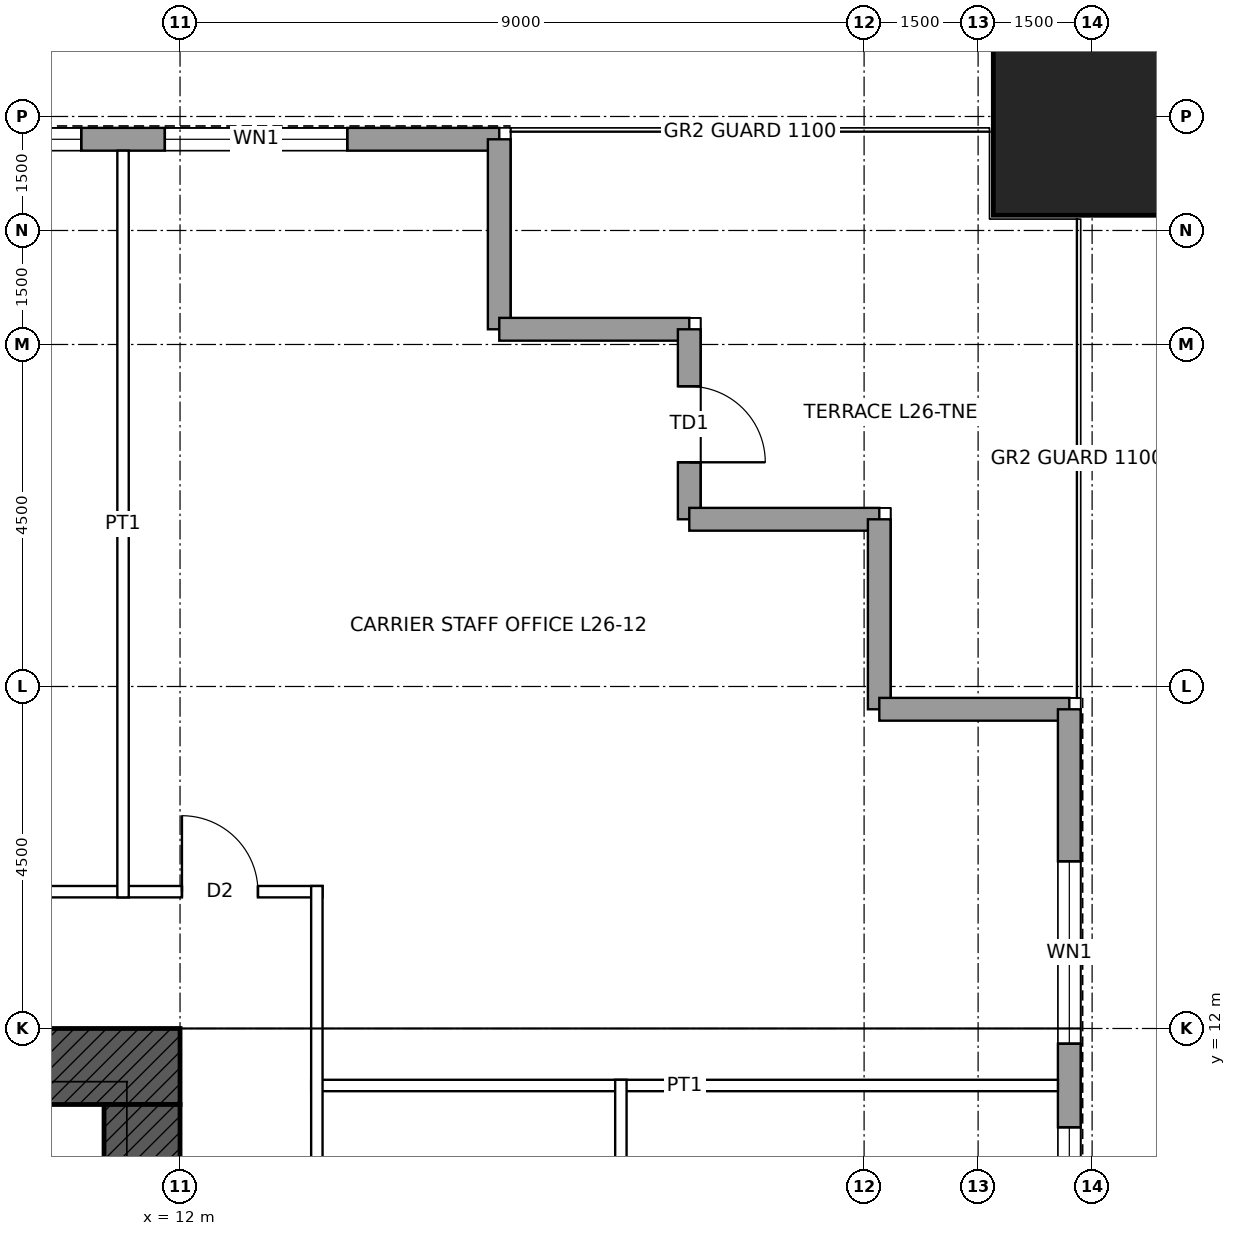
"""IFC4 building model, lengths in metres.
Left out: names, types, materials, properties, quantities, classifications, styles, units other than length and angle.
Written with IfcOpenShell. Run it as: python <this file> out.ifc"""

import sys

from ifc_helpers import new_model, si_unit, direction, frame, frame_2d, origin, origin_2d, place, context, subcontext, project, spatial, rectangle, hollow_rectangle, extrude, element, fill, save


model = new_model("IFC4")
c1 = context("Model", 3, precision=1e-05, world=origin(), true_north=direction((0.0, 1.0)))
c2 = subcontext(c1, "Body", "Model", "MODEL_VIEW")
j1 = project(units=[si_unit("LENGTHUNIT", "METRE"), si_unit("PLANEANGLEUNIT", "RADIAN")], contexts=[c1])
p1 = place(None, origin())
s1 = spatial("IfcSite", under=j1, at=p1, CompositionType="ELEMENT")
p2 = place(p1, origin())
s2 = spatial("IfcBuilding", under=s1, at=p2, CompositionType="ELEMENT")
p3 = place(p2, frame((0.0, 0.0, 131.4)))
s3 = spatial("IfcBuildingStorey", under=s2, at=p3, CompositionType="ELEMENT", Elevation=131.4)
p4 = place(p3, frame((24.0, 24.0, 0.0), z_axis=(0.0, 0.0, 1.0), x_axis=(1.0, 0.0, 0.0)))
e1 = element("IfcColumn", 1, at=p4, inside=s3, PredefinedType="COLUMN", context=c2, shape_type="SweptSolid", body=[
    extrude(hollow_rectangle(XDim=2.6, YDim=2.6, WallThickness=0.13, at=origin_2d()), origin(), (0.0, 0.0, 1.0), 4.5),
])
p5 = place(p3, frame((-12.0, 11.5, 0.0), z_axis=(0.0, 0.0, 1.0), x_axis=(1.0, 0.0, 0.0)))
e2 = element("IfcWall", 2, at=p5, inside=s3, PredefinedType="SHEAR", context=c2, shape_type="SweptSolid", body=[
    extrude(rectangle(XDim=24.0, YDim=1.0, at=frame_2d((12.0, 0.0))), origin(), (0.0, 0.0, 1.0), 4.5),
])
p6 = place(p5, frame((6.25, 0.0, 0.0)))
e3 = element("IfcOpeningElement", 3, at=p6, cuts=e2, PredefinedType="OPENING", context=c2, shape_type="SweptSolid", body=[
    extrude(rectangle(XDim=1.0, YDim=2.4, at=frame_2d((0.5, 1.2))), frame((0.0, 0.51, 0.0), z_axis=(0.0, -1.0, 0.0), x_axis=(1.0, 0.0, 0.0)), (0.0, 0.0, 1.0), 1.02),
])
p7 = place(p5, frame((16.75, 0.0, 0.0)))
e4 = element("IfcOpeningElement", 4, at=p7, cuts=e2, PredefinedType="OPENING", context=c2, shape_type="SweptSolid", body=[
    extrude(rectangle(XDim=1.0, YDim=2.4, at=frame_2d((0.5, 1.2))), frame((0.0, 0.51, 0.0), z_axis=(0.0, -1.0, 0.0), x_axis=(1.0, 0.0, 0.0)), (0.0, 0.0, 1.0), 1.02),
])
p8 = place(p3, frame((11.5, 11.0, 0.0), z_axis=(0.0, 0.0, 1.0), x_axis=(0.0, -1.0, 0.0)))
e5 = element("IfcWall", 5, at=p8, inside=s3, PredefinedType="SHEAR", context=c2, shape_type="SweptSolid", body=[
    extrude(rectangle(XDim=22.0, YDim=1.0, at=frame_2d((11.0, 0.0))), origin(), (0.0, 0.0, 1.0), 4.5),
])
p9 = place(p8, frame((10.5, 0.0, 0.0)))
e6 = element("IfcOpeningElement", 6, at=p9, cuts=e5, PredefinedType="OPENING", context=c2, shape_type="SweptSolid", body=[
    extrude(rectangle(XDim=1.0, YDim=2.4, at=frame_2d((0.5, 1.2))), frame((0.0, 0.51, 0.0), z_axis=(0.0, -1.0, 0.0), x_axis=(1.0, 0.0, 0.0)), (0.0, 0.0, 1.0), 1.02),
])
p10 = place(p3, frame((-16.2, 23.7, 0.0), z_axis=(0.0, 0.0, 1.0), x_axis=(1.0, 0.0, 0.0)))
e7 = element("IfcWall", 7, at=p10, inside=s3, PredefinedType="SOLIDWALL", context=c2, shape_type="SweptSolid", body=[
    extrude(rectangle(XDim=32.4, YDim=0.3, at=frame_2d((16.2, 0.0))), origin(), (0.0, 0.0, 1.0), 4.3),
])
p11 = place(p10, frame((2.0, 0.0, 1.0)))
e8 = element("IfcOpeningElement", 8, at=p11, cuts=e7, PredefinedType="OPENING", context=c2, shape_type="SweptSolid", body=[
    extrude(rectangle(XDim=2.4, YDim=1.2, at=frame_2d((1.2, 0.6))), frame((0.0, 0.16, 0.0), z_axis=(0.0, -1.0, 0.0), x_axis=(1.0, 0.0, 0.0)), (0.0, 0.0, 1.0), 0.32),
])
p12 = place(p10, frame((5.5, 0.0, 1.0)))
e9 = element("IfcOpeningElement", 9, at=p12, cuts=e7, PredefinedType="OPENING", context=c2, shape_type="SweptSolid", body=[
    extrude(rectangle(XDim=2.4, YDim=1.2, at=frame_2d((1.2, 0.6))), frame((0.0, 0.16, 0.0), z_axis=(0.0, -1.0, 0.0), x_axis=(1.0, 0.0, 0.0)), (0.0, 0.0, 1.0), 0.32),
])
p13 = place(p10, frame((9.5, 0.0, 1.0)))
e10 = element("IfcOpeningElement", 10, at=p13, cuts=e7, PredefinedType="OPENING", context=c2, shape_type="SweptSolid", body=[
    extrude(rectangle(XDim=2.4, YDim=1.2, at=frame_2d((1.2, 0.6))), frame((0.0, 0.16, 0.0), z_axis=(0.0, -1.0, 0.0), x_axis=(1.0, 0.0, 0.0)), (0.0, 0.0, 1.0), 0.32),
])
p14 = place(p10, frame((13.0, 0.0, 1.0)))
e11 = element("IfcOpeningElement", 11, at=p14, cuts=e7, PredefinedType="OPENING", context=c2, shape_type="SweptSolid", body=[
    extrude(rectangle(XDim=2.4, YDim=1.2, at=frame_2d((1.2, 0.6))), frame((0.0, 0.16, 0.0), z_axis=(0.0, -1.0, 0.0), x_axis=(1.0, 0.0, 0.0)), (0.0, 0.0, 1.0), 0.32),
])
p15 = place(p10, frame((17.0, 0.0, 1.0)))
e12 = element("IfcOpeningElement", 12, at=p15, cuts=e7, PredefinedType="OPENING", context=c2, shape_type="SweptSolid", body=[
    extrude(rectangle(XDim=2.4, YDim=1.2, at=frame_2d((1.2, 0.6))), frame((0.0, 0.16, 0.0), z_axis=(0.0, -1.0, 0.0), x_axis=(1.0, 0.0, 0.0)), (0.0, 0.0, 1.0), 0.32),
])
p16 = place(p10, frame((20.5, 0.0, 1.0)))
e13 = element("IfcOpeningElement", 13, at=p16, cuts=e7, PredefinedType="OPENING", context=c2, shape_type="SweptSolid", body=[
    extrude(rectangle(XDim=2.4, YDim=1.2, at=frame_2d((1.2, 0.6))), frame((0.0, 0.16, 0.0), z_axis=(0.0, -1.0, 0.0), x_axis=(1.0, 0.0, 0.0)), (0.0, 0.0, 1.0), 0.32),
])
p17 = place(p10, frame((24.5, 0.0, 1.0)))
e14 = element("IfcOpeningElement", 14, at=p17, cuts=e7, PredefinedType="OPENING", context=c2, shape_type="SweptSolid", body=[
    extrude(rectangle(XDim=2.4, YDim=1.2, at=frame_2d((1.2, 0.6))), frame((0.0, 0.16, 0.0), z_axis=(0.0, -1.0, 0.0), x_axis=(1.0, 0.0, 0.0)), (0.0, 0.0, 1.0), 0.32),
])
p18 = place(p10, frame((28.0, 0.0, 1.0)))
e15 = element("IfcOpeningElement", 15, at=p18, cuts=e7, PredefinedType="OPENING", context=c2, shape_type="SweptSolid", body=[
    extrude(rectangle(XDim=2.4, YDim=1.2, at=frame_2d((1.2, 0.6))), frame((0.0, 0.16, 0.0), z_axis=(0.0, -1.0, 0.0), x_axis=(1.0, 0.0, 0.0)), (0.0, 0.0, 1.0), 0.32),
])
for number, where, z_axis, x_axis in (
    (16, (16.2, 23.7, 0.0), (0.0, 0.0, 1.0), (0.0, -1.0, 0.0)),
    (17, (16.2, 21.2, 0.0), (0.0, 0.0, 1.0), (1.0, 0.0, 0.0)),
):
    element("IfcWall", number, at=place(p3, frame(where, z_axis=z_axis, x_axis=x_axis)), inside=s3, PredefinedType="SOLIDWALL", context=c2, shape_type="SweptSolid", body=[
        extrude(rectangle(XDim=2.5, YDim=0.3, at=frame_2d((1.25, 0.0))), origin(), (0.0, 0.0, 1.0), 4.3),
    ])
p19 = place(p3, frame((18.7, 21.2, 0.0), z_axis=(0.0, 0.0, 1.0), x_axis=(0.0, -1.0, 0.0)))
e18 = element("IfcWall", 18, at=p19, inside=s3, PredefinedType="SOLIDWALL", context=c2, shape_type="SweptSolid", body=[
    extrude(rectangle(XDim=2.5, YDim=0.3, at=frame_2d((1.25, 0.0))), origin(), (0.0, 0.0, 1.0), 4.3),
])
p20 = place(p19, frame((0.75, 0.0, 0.0)))
e19 = element("IfcOpeningElement", 19, at=p20, cuts=e18, PredefinedType="OPENING", context=c2, shape_type="SweptSolid", body=[
    extrude(rectangle(XDim=1.0, YDim=2.4, at=frame_2d((0.5, 1.2))), frame((0.0, 0.16, 0.0), z_axis=(0.0, -1.0, 0.0), x_axis=(1.0, 0.0, 0.0)), (0.0, 0.0, 1.0), 0.32),
])
for number, where, z_axis, x_axis in (
    (20, (18.7, 18.7, 0.0), (0.0, 0.0, 1.0), (1.0, 0.0, 0.0)),
    (21, (21.2, 18.7, 0.0), (0.0, 0.0, 1.0), (0.0, -1.0, 0.0)),
    (22, (21.2, 16.2, 0.0), (0.0, 0.0, 1.0), (1.0, 0.0, 0.0)),
):
    element("IfcWall", number, at=place(p3, frame(where, z_axis=z_axis, x_axis=x_axis)), inside=s3, PredefinedType="SOLIDWALL", context=c2, shape_type="SweptSolid", body=[
        extrude(rectangle(XDim=2.5, YDim=0.3, at=frame_2d((1.25, 0.0))), origin(), (0.0, 0.0, 1.0), 4.3),
    ])
p21 = place(p3, frame((23.7, 16.2, 0.0), z_axis=(0.0, 0.0, 1.0), x_axis=(0.0, -1.0, 0.0)))
e23 = element("IfcWall", 23, at=p21, inside=s3, PredefinedType="SOLIDWALL", context=c2, shape_type="SweptSolid", body=[
    extrude(rectangle(XDim=32.4, YDim=0.3, at=frame_2d((16.2, 0.0))), origin(), (0.0, 0.0, 1.0), 4.3),
])
p22 = place(p21, frame((2.0, 0.0, 1.0)))
e24 = element("IfcOpeningElement", 24, at=p22, cuts=e23, PredefinedType="OPENING", context=c2, shape_type="SweptSolid", body=[
    extrude(rectangle(XDim=2.4, YDim=1.2, at=frame_2d((1.2, 0.6))), frame((0.0, 0.16, 0.0), z_axis=(0.0, -1.0, 0.0), x_axis=(1.0, 0.0, 0.0)), (0.0, 0.0, 1.0), 0.32),
])
p23 = place(p21, frame((5.5, 0.0, 1.0)))
e25 = element("IfcOpeningElement", 25, at=p23, cuts=e23, PredefinedType="OPENING", context=c2, shape_type="SweptSolid", body=[
    extrude(rectangle(XDim=2.4, YDim=1.2, at=frame_2d((1.2, 0.6))), frame((0.0, 0.16, 0.0), z_axis=(0.0, -1.0, 0.0), x_axis=(1.0, 0.0, 0.0)), (0.0, 0.0, 1.0), 0.32),
])
p24 = place(p21, frame((9.5, 0.0, 1.0)))
e26 = element("IfcOpeningElement", 26, at=p24, cuts=e23, PredefinedType="OPENING", context=c2, shape_type="SweptSolid", body=[
    extrude(rectangle(XDim=2.4, YDim=1.2, at=frame_2d((1.2, 0.6))), frame((0.0, 0.16, 0.0), z_axis=(0.0, -1.0, 0.0), x_axis=(1.0, 0.0, 0.0)), (0.0, 0.0, 1.0), 0.32),
])
p25 = place(p21, frame((13.0, 0.0, 1.0)))
e27 = element("IfcOpeningElement", 27, at=p25, cuts=e23, PredefinedType="OPENING", context=c2, shape_type="SweptSolid", body=[
    extrude(rectangle(XDim=2.4, YDim=1.2, at=frame_2d((1.2, 0.6))), frame((0.0, 0.16, 0.0), z_axis=(0.0, -1.0, 0.0), x_axis=(1.0, 0.0, 0.0)), (0.0, 0.0, 1.0), 0.32),
])
p26 = place(p21, frame((17.0, 0.0, 1.0)))
e28 = element("IfcOpeningElement", 28, at=p26, cuts=e23, PredefinedType="OPENING", context=c2, shape_type="SweptSolid", body=[
    extrude(rectangle(XDim=2.4, YDim=1.2, at=frame_2d((1.2, 0.6))), frame((0.0, 0.16, 0.0), z_axis=(0.0, -1.0, 0.0), x_axis=(1.0, 0.0, 0.0)), (0.0, 0.0, 1.0), 0.32),
])
p27 = place(p21, frame((20.5, 0.0, 1.0)))
e29 = element("IfcOpeningElement", 29, at=p27, cuts=e23, PredefinedType="OPENING", context=c2, shape_type="SweptSolid", body=[
    extrude(rectangle(XDim=2.4, YDim=1.2, at=frame_2d((1.2, 0.6))), frame((0.0, 0.16, 0.0), z_axis=(0.0, -1.0, 0.0), x_axis=(1.0, 0.0, 0.0)), (0.0, 0.0, 1.0), 0.32),
])
p28 = place(p21, frame((24.5, 0.0, 1.0)))
e30 = element("IfcOpeningElement", 30, at=p28, cuts=e23, PredefinedType="OPENING", context=c2, shape_type="SweptSolid", body=[
    extrude(rectangle(XDim=2.4, YDim=1.2, at=frame_2d((1.2, 0.6))), frame((0.0, 0.16, 0.0), z_axis=(0.0, -1.0, 0.0), x_axis=(1.0, 0.0, 0.0)), (0.0, 0.0, 1.0), 0.32),
])
p29 = place(p21, frame((28.0, 0.0, 1.0)))
e31 = element("IfcOpeningElement", 31, at=p29, cuts=e23, PredefinedType="OPENING", context=c2, shape_type="SweptSolid", body=[
    extrude(rectangle(XDim=2.4, YDim=1.2, at=frame_2d((1.2, 0.6))), frame((0.0, 0.16, 0.0), z_axis=(0.0, -1.0, 0.0), x_axis=(1.0, 0.0, 0.0)), (0.0, 0.0, 1.0), 0.32),
])
p30 = place(p3, frame((13.725, 11.25, 0.0), z_axis=(0.0, 0.0, 1.0), x_axis=(1.0, 0.0, 0.0)))
e32 = element("IfcWall", 32, at=p30, inside=s3, PredefinedType="PARTITIONING", context=c2, shape_type="SweptSolid", body=[
    extrude(rectangle(XDim=9.825, YDim=0.15, at=frame_2d((4.913, 0.0))), origin(), (0.0, 0.0, 1.0), 3.431),
])
p31 = place(p3, frame((-13.875, 13.8, 0.0), z_axis=(0.0, 0.0, 1.0), x_axis=(1.0, 0.0, 0.0)))
e33 = element("IfcWall", 33, at=p31, inside=s3, PredefinedType="PARTITIONING", context=c2, shape_type="SweptSolid", body=[
    extrude(rectangle(XDim=27.75, YDim=0.15, at=frame_2d((13.875, 0.0))), origin(), (0.0, 0.0, 1.0), 4.3),
])
p32 = place(p31, frame((5.475, 0.0, 0.0)))
e34 = element("IfcOpeningElement", 34, at=p32, cuts=e33, PredefinedType="OPENING", context=c2, shape_type="SweptSolid", body=[
    extrude(rectangle(XDim=1.8, YDim=2.4, at=frame_2d((0.9, 1.2))), frame((0.0, 0.085, 0.0), z_axis=(0.0, -1.0, 0.0), x_axis=(1.0, 0.0, 0.0)), (0.0, 0.0, 1.0), 0.17),
])
p33 = place(p31, frame((13.375, 0.0, 0.0)))
e35 = element("IfcOpeningElement", 35, at=p33, cuts=e33, PredefinedType="OPENING", context=c2, shape_type="SweptSolid", body=[
    extrude(rectangle(XDim=1.0, YDim=2.1, at=frame_2d((0.5, 1.05))), frame((0.0, 0.085, 0.0), z_axis=(0.0, -1.0, 0.0), x_axis=(1.0, 0.0, 0.0)), (0.0, 0.0, 1.0), 0.17),
])
p34 = place(p31, frame((20.475, 0.0, 0.0)))
e36 = element("IfcOpeningElement", 36, at=p34, cuts=e33, PredefinedType="OPENING", context=c2, shape_type="SweptSolid", body=[
    extrude(rectangle(XDim=1.8, YDim=2.4, at=frame_2d((0.9, 1.2))), frame((0.0, 0.085, 0.0), z_axis=(0.0, -1.0, 0.0), x_axis=(1.0, 0.0, 0.0)), (0.0, 0.0, 1.0), 0.17),
])
p35 = place(p31, frame((25.9, 0.0, 0.0)))
e37 = element("IfcOpeningElement", 37, at=p35, cuts=e33, PredefinedType="OPENING", context=c2, shape_type="SweptSolid", body=[
    extrude(rectangle(XDim=1.0, YDim=2.1, at=frame_2d((0.5, 1.05))), frame((0.0, 0.085, 0.0), z_axis=(0.0, -1.0, 0.0), x_axis=(1.0, 0.0, 0.0)), (0.0, 0.0, 1.0), 0.17),
])
p36 = place(p31, frame((0.85, 0.0, 0.0)))
e38 = element("IfcOpeningElement", 38, at=p36, cuts=e33, PredefinedType="OPENING", context=c2, shape_type="SweptSolid", body=[
    extrude(rectangle(XDim=1.0, YDim=2.1, at=frame_2d((0.5, 1.05))), frame((0.0, 0.085, 0.0), z_axis=(0.0, -1.0, 0.0), x_axis=(1.0, 0.0, 0.0)), (0.0, 0.0, 1.0), 0.17),
])
p37 = place(p3, frame((11.25, 13.725, 0.0), z_axis=(0.0, 0.0, 1.0), x_axis=(0.0, 1.0, 0.0)))
e39 = element("IfcWall", 39, at=p37, inside=s3, PredefinedType="PARTITIONING", context=c2, shape_type="SweptSolid", body=[
    extrude(rectangle(XDim=9.825, YDim=0.15, at=frame_2d((4.913, 0.0))), origin(), (0.0, 0.0, 1.0), 3.431),
])
p38 = place(p3, frame((13.8, -13.875, 0.0), z_axis=(0.0, 0.0, 1.0), x_axis=(0.0, 1.0, 0.0)))
e40 = element("IfcWall", 40, at=p38, inside=s3, PredefinedType="PARTITIONING", context=c2, shape_type="SweptSolid", body=[
    extrude(rectangle(XDim=27.75, YDim=0.15, at=frame_2d((13.875, 0.0))), origin(), (0.0, 0.0, 1.0), 4.3),
])
p39 = place(p38, frame((20.875, 0.0, 0.0)))
e41 = element("IfcOpeningElement", 41, at=p39, cuts=e40, PredefinedType="OPENING", context=c2, shape_type="SweptSolid", body=[
    extrude(rectangle(XDim=1.0, YDim=2.1, at=frame_2d((0.5, 1.05))), frame((0.0, 0.085, 0.0), z_axis=(0.0, -1.0, 0.0), x_axis=(1.0, 0.0, 0.0)), (0.0, 0.0, 1.0), 0.17),
])
p40 = place(p38, frame((9.225, 0.0, 0.0)))
e42 = element("IfcOpeningElement", 42, at=p40, cuts=e40, PredefinedType="OPENING", context=c2, shape_type="SweptSolid", body=[
    extrude(rectangle(XDim=1.8, YDim=2.4, at=frame_2d((0.9, 1.2))), frame((0.0, 0.085, 0.0), z_axis=(0.0, -1.0, 0.0), x_axis=(1.0, 0.0, 0.0)), (0.0, 0.0, 1.0), 0.17),
])
p41 = place(p3, frame((17.8, 3.675, 0.0), z_axis=(0.0, 0.0, 1.0), x_axis=(0.0, 1.0, 0.0)))
e43 = element("IfcWall", 43, at=p41, inside=s3, PredefinedType="PARTITIONING", context=c2, shape_type="SweptSolid", body=[
    extrude(rectangle(XDim=7.65, YDim=0.15, at=frame_2d((3.825, 0.0))), origin(), (0.0, 0.0, 1.0), 4.3),
])
p42 = place(p17, origin())
e44 = element("IfcWindow", 44, at=p42, inside=s3, PartitioningType="SINGLE_PANEL", PredefinedType="WINDOW", context=c2, shape_type="SweptSolid", body=[
    extrude(rectangle(XDim=2.4, YDim=1.2, at=frame_2d((1.2, 0.6))), frame((0.0, 0.03, 0.0), z_axis=(0.0, -1.0, 0.0), x_axis=(1.0, 0.0, 0.0)), (0.0, 0.0, 1.0), 0.06),
])
fill(e14, e44)
p43 = place(p18, origin())
e45 = element("IfcWindow", 45, at=p43, inside=s3, PartitioningType="SINGLE_PANEL", PredefinedType="WINDOW", context=c2, shape_type="SweptSolid", body=[
    extrude(rectangle(XDim=2.4, YDim=1.2, at=frame_2d((1.2, 0.6))), frame((0.0, 0.03, 0.0), z_axis=(0.0, -1.0, 0.0), x_axis=(1.0, 0.0, 0.0)), (0.0, 0.0, 1.0), 0.06),
])
fill(e15, e45)
p44 = place(p20, origin())
e46 = element("IfcDoor", 46, at=p44, inside=s3, OperationType="SINGLE_SWING_RIGHT", PredefinedType="DOOR", context=c2, shape_type="SweptSolid", body=[
    extrude(rectangle(XDim=1.0, YDim=2.4, at=frame_2d((0.5, 1.2))), frame((0.0, 0.025, 0.0), z_axis=(0.0, -1.0, 0.0), x_axis=(1.0, 0.0, 0.0)), (0.0, 0.0, 1.0), 0.05),
])
fill(e19, e46)
p45 = place(p22, origin())
e47 = element("IfcWindow", 47, at=p45, inside=s3, PartitioningType="SINGLE_PANEL", PredefinedType="WINDOW", context=c2, shape_type="SweptSolid", body=[
    extrude(rectangle(XDim=2.4, YDim=1.2, at=frame_2d((1.2, 0.6))), frame((0.0, 0.03, 0.0), z_axis=(0.0, -1.0, 0.0), x_axis=(1.0, 0.0, 0.0)), (0.0, 0.0, 1.0), 0.06),
])
fill(e24, e47)
p46 = place(p23, origin())
e48 = element("IfcWindow", 48, at=p46, inside=s3, PartitioningType="SINGLE_PANEL", PredefinedType="WINDOW", context=c2, shape_type="SweptSolid", body=[
    extrude(rectangle(XDim=2.4, YDim=1.2, at=frame_2d((1.2, 0.6))), frame((0.0, 0.03, 0.0), z_axis=(0.0, -1.0, 0.0), x_axis=(1.0, 0.0, 0.0)), (0.0, 0.0, 1.0), 0.06),
])
fill(e25, e48)
p47 = place(p35, origin())
e49 = element("IfcDoor", 49, at=p47, inside=s3, OperationType="SINGLE_SWING_LEFT", PredefinedType="DOOR", context=c2, shape_type="SweptSolid", body=[
    extrude(rectangle(XDim=1.0, YDim=2.1, at=frame_2d((0.5, 1.05))), frame((0.0, 0.025, 0.0), z_axis=(0.0, -1.0, 0.0), x_axis=(1.0, 0.0, 0.0)), (0.0, 0.0, 1.0), 0.05),
])
fill(e37, e49)
save(model, sys.argv[1])
